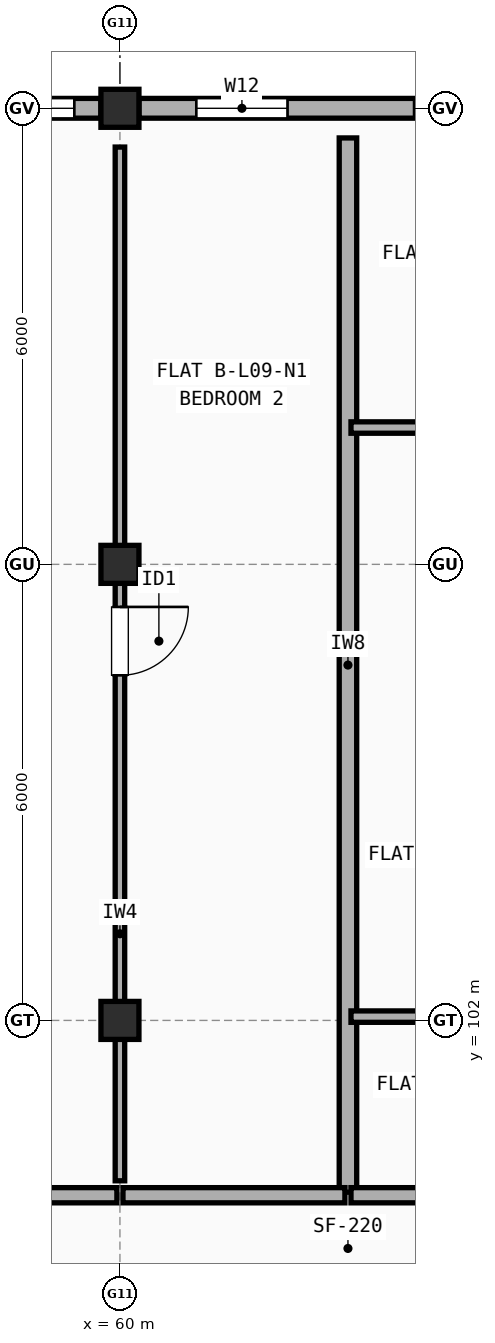
"""IFC4 building model, lengths in metres.
Left out: names, types, materials, properties, quantities, classifications, styles, units other than length and angle.
Written with IfcOpenShell. Run it as: python <this file> out.ifc"""

import sys

from ifc_helpers import new_model, si_unit, direction, frame, frame_2d, origin, origin_2d, place, context, subcontext, project, spatial, rectangle, extrude, element, fill, save


model = new_model("IFC4")
c1 = context("Model", 3, precision=1e-05, world=origin(), true_north=direction((0.0, 1.0)))
c2 = subcontext(c1, "Body", "Model", "MODEL_VIEW")
j1 = project(units=[si_unit("LENGTHUNIT", "METRE"), si_unit("PLANEANGLEUNIT", "RADIAN")], contexts=[c1])
p1 = place(None, origin())
s1 = spatial("IfcSite", under=j1, at=p1, CompositionType="ELEMENT")
p2 = place(p1, origin())
s2 = spatial("IfcBuilding", under=s1, at=p2, CompositionType="ELEMENT")
p3 = place(p2, frame((0.0, 0.0, 30.1)))
s3 = spatial("IfcBuildingStorey", under=s2, at=p3, CompositionType="ELEMENT", Elevation=30.1)
for number, where, z_axis, x_axis in (
    (1, (60.0, 102.0, 0.0), (0.0, 0.0, 1.0), (1.0, 0.0, 0.0)),
    (2, (60.0, 108.0, 0.0), (0.0, 0.0, 1.0), (1.0, 0.0, 0.0)),
    (3, (60.0, 114.0, 0.0), (0.0, 0.0, 1.0), (1.0, 0.0, 0.0)),
):
    element("IfcColumn", number, at=place(p3, frame(where, z_axis=z_axis, x_axis=x_axis)), inside=s3, PredefinedType="COLUMN", context=c2, shape_type="SweptSolid", body=[
        extrude(rectangle(XDim=0.5, YDim=0.5, at=origin_2d()), origin(), (0.0, 0.0, 1.0), 2.985),
    ])
p4 = place(p3, frame((65.75, 114.0, 0.0), z_axis=(0.0, 0.0, 1.0), x_axis=(-1.0, 0.0, 0.0)))
e4 = element("IfcWall", 4, at=p4, inside=s3, PredefinedType="STANDARD", context=c2, shape_type="SweptSolid", body=[
    extrude(rectangle(XDim=5.5, YDim=0.26, at=frame_2d((2.75, 0.0))), origin(), (0.0, 0.0, 1.0), 2.467),
])
p5 = place(p4, frame((0.83, 0.0, 0.9)))
e5 = element("IfcOpeningElement", 5, at=p5, cuts=e4, PredefinedType="OPENING", context=c2, shape_type="SweptSolid", body=[
    extrude(rectangle(XDim=1.05, YDim=1.35, at=frame_2d((0.525, 0.675))), frame((0.0, 0.14, 0.0), z_axis=(0.0, -1.0, 0.0), x_axis=(1.0, 0.0, 0.0)), (0.0, 0.0, 1.0), 0.28),
])
p6 = place(p4, frame((3.545, 0.0, 0.9)))
e6 = element("IfcOpeningElement", 6, at=p6, cuts=e4, PredefinedType="OPENING", context=c2, shape_type="SweptSolid", body=[
    extrude(rectangle(XDim=1.2, YDim=1.35, at=frame_2d((0.6, 0.675))), frame((0.0, 0.14, 0.0), z_axis=(0.0, -1.0, 0.0), x_axis=(1.0, 0.0, 0.0)), (0.0, 0.0, 1.0), 0.28),
])
p7 = place(p3, frame((59.75, 114.0, 0.0), z_axis=(0.0, 0.0, 1.0), x_axis=(-1.0, 0.0, 0.0)))
e7 = element("IfcWall", 7, at=p7, inside=s3, PredefinedType="STANDARD", context=c2, shape_type="SweptSolid", body=[
    extrude(rectangle(XDim=5.5, YDim=0.26, at=frame_2d((2.75, 0.0))), origin(), (0.0, 0.0, 1.0), 2.467),
])
p8 = place(p7, frame((0.35, 0.0, 0.9)))
e8 = element("IfcOpeningElement", 8, at=p8, cuts=e7, PredefinedType="OPENING", context=c2, shape_type="SweptSolid", body=[
    extrude(rectangle(XDim=1.5, YDim=1.4, at=frame_2d((0.75, 0.7))), frame((0.0, 0.14, 0.0), z_axis=(0.0, -1.0, 0.0), x_axis=(1.0, 0.0, 0.0)), (0.0, 0.0, 1.0), 0.28),
])
p9 = place(p7, frame((3.65, 0.0, 0.9)))
e9 = element("IfcOpeningElement", 9, at=p9, cuts=e7, PredefinedType="OPENING", context=c2, shape_type="SweptSolid", body=[
    extrude(rectangle(XDim=1.5, YDim=1.4, at=frame_2d((0.75, 0.7))), frame((0.0, 0.14, 0.0), z_axis=(0.0, -1.0, 0.0), x_axis=(1.0, 0.0, 0.0)), (0.0, 0.0, 1.0), 0.28),
])
p10 = place(p3, frame((63.0, 99.74, 0.0), z_axis=(0.0, 0.0, 1.0), x_axis=(0.0, 1.0, 0.0)))
e10 = element("IfcWall", 10, at=p10, inside=s3, PredefinedType="SOLIDWALL", context=c2, shape_type="SweptSolid", body=[
    extrude(rectangle(XDim=13.87, YDim=0.23, at=frame_2d((6.935, 0.0))), origin(), (0.0, 0.0, 1.0), 2.467),
])
p11 = place(p3, frame((52.54, 99.7, 0.0), z_axis=(0.0, 0.0, 1.0), x_axis=(1.0, 0.0, 0.0)))
e11 = element("IfcWall", 11, at=p11, inside=s3, PredefinedType="SOLIDWALL", context=c2, shape_type="SweptSolid", body=[
    extrude(rectangle(XDim=7.42, YDim=0.2, at=frame_2d((3.71, 0.0))), origin(), (0.0, 0.0, 1.0), 2.508),
])
p12 = place(p11, frame((3.21, 0.0, 0.0)))
e12 = element("IfcOpeningElement", 12, at=p12, cuts=e11, PredefinedType="OPENING", context=c2, shape_type="SweptSolid", body=[
    extrude(rectangle(XDim=1.0, YDim=2.15, at=frame_2d((0.5, 1.075))), frame((0.0, 0.11, 0.0), z_axis=(0.0, -1.0, 0.0), x_axis=(1.0, 0.0, 0.0)), (0.0, 0.0, 1.0), 0.22),
])
p13 = place(p3, frame((60.04, 99.7, 0.0), z_axis=(0.0, 0.0, 1.0), x_axis=(1.0, 0.0, 0.0)))
e13 = element("IfcWall", 13, at=p13, inside=s3, PredefinedType="SOLIDWALL", context=c2, shape_type="SweptSolid", body=[
    extrude(rectangle(XDim=2.92, YDim=0.2, at=frame_2d((1.46, 0.0))), origin(), (0.0, 0.0, 1.0), 2.508),
])
p14 = place(p3, frame((60.0, 99.89, 0.0), z_axis=(0.0, 0.0, 1.0), x_axis=(0.0, 1.0, 0.0)))
e14 = element("IfcWall", 14, at=p14, inside=s3, PredefinedType="PARTITIONING", context=c2, shape_type="SweptSolid", body=[
    extrude(rectangle(XDim=13.6, YDim=0.125, at=frame_2d((6.8, 0.0))), origin(), (0.0, 0.0, 1.0), 2.508),
])
p15 = place(p14, frame((6.65, 0.0, 0.0)))
e15 = element("IfcOpeningElement", 15, at=p15, cuts=e14, PredefinedType="OPENING", context=c2, shape_type="SweptSolid", body=[
    extrude(rectangle(XDim=0.9, YDim=2.1, at=frame_2d((0.45, 1.05))), frame((0.0, 0.073, 0.0), z_axis=(0.0, -1.0, 0.0), x_axis=(1.0, 0.0, 0.0)), (0.0, 0.0, 1.0), 0.145),
])
p16 = place(p3, frame((63.04, 99.7, 0.0), z_axis=(0.0, 0.0, 1.0), x_axis=(1.0, 0.0, 0.0)))
e16 = element("IfcWall", 16, at=p16, inside=s3, PredefinedType="SOLIDWALL", context=c2, shape_type="SweptSolid", body=[
    extrude(rectangle(XDim=4.42, YDim=0.2, at=frame_2d((2.21, 0.0))), origin(), (0.0, 0.0, 1.0), 2.985),
])
p17 = place(p3, frame((63.04, 109.8, 0.0), z_axis=(0.0, 0.0, 1.0), x_axis=(1.0, 0.0, 0.0)))
e17 = element("IfcWall", 17, at=p17, inside=s3, PredefinedType="PARTITIONING", context=c2, shape_type="SweptSolid", body=[
    extrude(rectangle(XDim=4.42, YDim=0.15, at=frame_2d((2.21, 0.0))), origin(), (0.0, 0.0, 1.0), 2.508),
])
p18 = place(p3, frame((63.04, 102.05, 0.0), z_axis=(0.0, 0.0, 1.0), x_axis=(1.0, 0.0, 0.0)))
e18 = element("IfcWall", 18, at=p18, inside=s3, PredefinedType="PARTITIONING", context=c2, shape_type="SweptSolid", body=[
    extrude(rectangle(XDim=4.42, YDim=0.15, at=frame_2d((2.21, 0.0))), origin(), (0.0, 0.0, 1.0), 2.467),
])
p19 = place(p5, origin())
e19 = element("IfcWindow", 19, at=p19, inside=s3, PartitioningType="SINGLE_PANEL", PredefinedType="WINDOW", context=c2, shape_type="SweptSolid", body=[
    extrude(rectangle(XDim=1.05, YDim=1.35, at=frame_2d((0.525, 0.675))), frame((0.0, 0.03, 0.0), z_axis=(0.0, -1.0, 0.0), x_axis=(1.0, 0.0, 0.0)), (0.0, 0.0, 1.0), 0.06),
])
fill(e5, e19)
p20 = place(p6, origin())
e20 = element("IfcWindow", 20, at=p20, inside=s3, PartitioningType="SINGLE_PANEL", PredefinedType="WINDOW", context=c2, shape_type="SweptSolid", body=[
    extrude(rectangle(XDim=1.2, YDim=1.35, at=frame_2d((0.6, 0.675))), frame((0.0, 0.03, 0.0), z_axis=(0.0, -1.0, 0.0), x_axis=(1.0, 0.0, 0.0)), (0.0, 0.0, 1.0), 0.06),
])
fill(e6, e20)
p21 = place(p8, origin())
e21 = element("IfcWindow", 21, at=p21, inside=s3, PartitioningType="SINGLE_PANEL", PredefinedType="WINDOW", context=c2, shape_type="SweptSolid", body=[
    extrude(rectangle(XDim=1.5, YDim=1.4, at=frame_2d((0.75, 0.7))), frame((0.0, 0.03, 0.0), z_axis=(0.0, -1.0, 0.0), x_axis=(1.0, 0.0, 0.0)), (0.0, 0.0, 1.0), 0.06),
])
fill(e8, e21)
p22 = place(p15, origin())
e22 = element("IfcDoor", 22, at=p22, inside=s3, OperationType="SINGLE_SWING_RIGHT", PredefinedType="DOOR", context=c2, shape_type="SweptSolid", body=[
    extrude(rectangle(XDim=0.9, YDim=2.1, at=frame_2d((0.45, 1.05))), frame((0.0, 0.025, 0.0), z_axis=(0.0, -1.0, 0.0), x_axis=(1.0, 0.0, 0.0)), (0.0, 0.0, 1.0), 0.05),
])
fill(e15, e22)
save(model, sys.argv[1])
